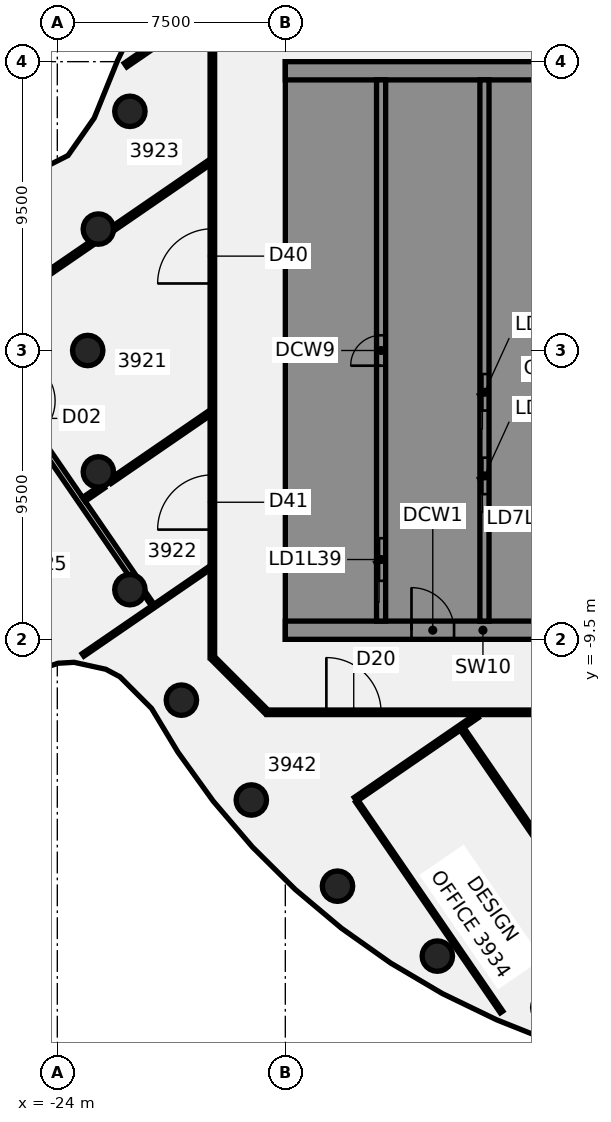
"""IFC4 building model, lengths in metres.
Left out: names, types, materials, properties, quantities, classifications, styles, units other than length and angle.
Written with IfcOpenShell. Run it as: python <this file> out.ifc"""

import sys

from ifc_helpers import new_model, si_unit, direction, frame, frame_2d, origin, origin_2d, place, context, subcontext, project, spatial, polyline, rectangle, circle, outline, extrude, element, fill, save


model = new_model("IFC4")
c1 = context("Model", 3, precision=1e-05, world=origin(), true_north=direction((0.0, 1.0)))
c2 = subcontext(c1, "Body", "Model", "MODEL_VIEW")
j1 = project(units=[si_unit("LENGTHUNIT", "METRE"), si_unit("PLANEANGLEUNIT", "RADIAN")], contexts=[c1])
p1 = place(None, origin())
s1 = spatial("IfcSite", under=j1, at=p1, CompositionType="ELEMENT")
p2 = place(p1, origin())
s2 = spatial("IfcBuilding", under=s1, at=p2, CompositionType="ELEMENT")
p3 = place(p2, frame((0.0, 0.0, 159.25)))
s3 = spatial("IfcBuildingStorey", under=s2, at=p3, CompositionType="ELEMENT", Elevation=159.25)
for number, where, z_axis, x_axis in (
    (1, (-21.613, 7.866, -0.14), (0.0, 0.0, 1.0), (1.0, 0.0, 0.0)),
    (2, (-22.651, 3.994, -0.14), (0.0, 0.0, 1.0), (1.0, 0.0, 0.0)),
    (3, (-23.0, 0.0, -0.14), (0.0, 0.0, 1.0), (1.0, 0.0, 0.0)),
    (4, (-22.651, -3.994, -0.14), (0.0, 0.0, 1.0), (1.0, 0.0, 0.0)),
    (5, (-21.613, -7.866, -0.14), (0.0, 0.0, 1.0), (1.0, 0.0, 0.0)),
    (6, (-19.919, -11.5, -0.14), (0.0, 0.0, 1.0), (1.0, 0.0, 0.0)),
    (7, (-17.619, -14.784, -0.14), (0.0, 0.0, 1.0), (1.0, 0.0, 0.0)),
    (8, (-14.784, -17.619, -0.14), (0.0, 0.0, 1.0), (1.0, 0.0, 0.0)),
    (9, (-11.5, -19.919, -0.14), (0.0, 0.0, 1.0), (1.0, 0.0, 0.0)),
):
    element("IfcColumn", number, at=place(p3, frame(where, z_axis=z_axis, x_axis=x_axis)), inside=s3, PredefinedType="COLUMN", context=c2, shape_type="SweptSolid", body=[
        extrude(circle(Radius=0.5, at=origin_2d()), origin(), (0.0, 0.0, 1.0), 3.75),
    ])
p4 = place(p3, frame((-28.925, 3.371, 0.0), z_axis=(0.0, 0.0, 1.0), x_axis=(0.566012012603, -0.82439699271, 0.0)))
e10 = element("IfcWall", 10, at=p4, inside=s3, PredefinedType="PARTITIONING", context=c2, shape_type="SweptSolid", body=[
    extrude(rectangle(XDim=13.034, YDim=0.2, at=frame_2d((6.517, 0.0))), origin(), (0.0, 0.0, 1.0), 3.01),
])
p5 = place(p4, frame((6.099, 0.0, 0.0)))
e11 = element("IfcOpeningElement", 11, at=p5, cuts=e10, PredefinedType="OPENING", context=c2, shape_type="SweptSolid", body=[
    extrude(rectangle(XDim=1.4, YDim=2.1, at=frame_2d((0.7, 1.05))), frame((0.0, 0.11, 0.0), z_axis=(0.0, -1.0, 0.0), x_axis=(1.0, 0.0, 0.0)), (0.0, 0.0, 1.0), 0.22),
])
p6 = place(p3, frame((-21.133, -7.977, 0.0), z_axis=(0.0, 0.0, 1.0), x_axis=(0.565734664981, -0.824587344579, 0.0)))
e12 = element("IfcWall", 12, at=p6, inside=s3, PredefinedType="PARTITIONING", context=c2, shape_type="SweptSolid", body=[
    extrude(rectangle(XDim=0.483, YDim=0.1, at=frame_2d((0.241, 0.0))), origin(), (0.0, 0.0, 1.0), 3.01),
])
p7 = place(p3, frame((-14.147, -14.824, 0.0), z_axis=(0.0, 0.0, 1.0), x_axis=(0.566078955543, -0.824351027228, 0.0)))
e13 = element("IfcWall", 13, at=p7, inside=s3, PredefinedType="PARTITIONING", context=c2, shape_type="SweptSolid", body=[
    extrude(rectangle(XDim=8.408, YDim=0.1, at=frame_2d((4.204, 0.0))), origin(), (0.0, 0.0, 1.0), 3.01),
])
p8 = place(p3, frame((-10.683, -12.45, 0.0), z_axis=(0.0, 0.0, 1.0), x_axis=(0.566088385471, -0.82434455165, 0.0)))
e14 = element("IfcWall", 14, at=p8, inside=s3, PredefinedType="PARTITIONING", context=c2, shape_type="SweptSolid", body=[
    extrude(rectangle(XDim=11.765, YDim=0.15, at=frame_2d((5.882, 0.0))), origin(), (0.0, 0.0, 1.0), 3.01),
])
p9 = place(p8, frame((3.82, 0.0, 0.0)))
e15 = element("IfcOpeningElement", 15, at=p9, cuts=e14, PredefinedType="OPENING", context=c2, shape_type="SweptSolid", body=[
    extrude(rectangle(XDim=0.9, YDim=2.1, at=frame_2d((0.45, 1.05))), frame((0.0, 0.085, 0.0), z_axis=(0.0, -1.0, 0.0), x_axis=(1.0, 0.0, 0.0)), (0.0, 0.0, 1.0), 0.17),
])
p10 = place(p3, frame((-18.872, -10.128, 0.0), z_axis=(0.0, 0.0, 1.0), x_axis=(0.707106781187, -0.707106781187, 0.0)))
e16 = element("IfcWall", 16, at=p10, inside=s3, PredefinedType="PARTITIONING", context=c2, shape_type="SweptSolid", body=[
    extrude(rectangle(XDim=2.465, YDim=0.15, at=frame_2d((1.232, 0.0))), origin(), (0.0, 0.0, 1.0), 3.01),
])
p11 = place(p3, frame((-17.1, -11.9, 0.0), z_axis=(0.0, 0.0, 1.0), x_axis=(1.0, 0.0, 0.0)))
e17 = element("IfcWall", 17, at=p11, inside=s3, PredefinedType="PARTITIONING", context=c2, shape_type="SweptSolid", body=[
    extrude(rectangle(XDim=34.165, YDim=0.15, at=frame_2d((17.083, 0.0))), origin(), (0.0, 0.0, 1.0), 3.01),
])
p12 = place(p11, frame((9.777, 0.0, 0.0)))
e18 = element("IfcOpeningElement", 18, at=p12, cuts=e17, PredefinedType="OPENING", context=c2, shape_type="SweptSolid", body=[
    extrude(rectangle(XDim=1.8, YDim=2.1, at=frame_2d((0.9, 1.05))), frame((0.0, 0.085, 0.0), z_axis=(0.0, -1.0, 0.0), x_axis=(1.0, 0.0, 0.0)), (0.0, 0.0, 1.0), 0.17),
])
p13 = place(p11, frame((1.95, 0.0, 0.0)))
e19 = element("IfcOpeningElement", 19, at=p13, cuts=e17, PredefinedType="OPENING", context=c2, shape_type="SweptSolid", body=[
    extrude(rectangle(XDim=1.8, YDim=2.1, at=frame_2d((0.9, 1.05))), frame((0.0, 0.085, 0.0), z_axis=(0.0, -1.0, 0.0), x_axis=(1.0, 0.0, 0.0)), (0.0, 0.0, 1.0), 0.17),
])
p14 = place(p11, frame((23.884, 0.0, 0.0)))
e20 = element("IfcOpeningElement", 20, at=p14, cuts=e17, PredefinedType="OPENING", context=c2, shape_type="SweptSolid", body=[
    extrude(rectangle(XDim=1.8, YDim=2.1, at=frame_2d((0.9, 1.05))), frame((0.0, 0.085, 0.0), z_axis=(0.0, -1.0, 0.0), x_axis=(1.0, 0.0, 0.0)), (0.0, 0.0, 1.0), 0.17),
])
p15 = place(p3, frame((-26.975, 0.708, 0.0), z_axis=(0.0, 0.0, 1.0), x_axis=(0.824360979783, 0.566064461887, 0.0)))
e21 = element("IfcWall", 21, at=p15, inside=s3, PredefinedType="PARTITIONING", context=c2, shape_type="SweptSolid", body=[
    extrude(rectangle(XDim=4.999, YDim=0.15, at=frame_2d((2.5, 0.0))), origin(), (0.0, 0.0, 1.0), 3.01),
])
p16 = place(p15, frame((2.6, 0.0, 0.0)))
e22 = element("IfcOpeningElement", 22, at=p16, cuts=e21, PredefinedType="OPENING", context=c2, shape_type="SweptSolid", body=[
    extrude(rectangle(XDim=0.9, YDim=2.1, at=frame_2d((0.45, 1.05))), frame((0.0, 0.085, 0.0), z_axis=(0.0, -1.0, 0.0), x_axis=(1.0, 0.0, 0.0)), (0.0, 0.0, 1.0), 0.17),
])
p17 = place(p3, frame((-22.148, 4.023, 0.0), z_axis=(0.0, 0.0, 1.0), x_axis=(0.824392319221, 0.566018819484, 0.0)))
e23 = element("IfcWall", 23, at=p17, inside=s3, PredefinedType="PARTITIONING", context=c2, shape_type="SweptSolid", body=[
    extrude(rectangle(XDim=3.82, YDim=0.15, at=frame_2d((1.91, 0.0))), origin(), (0.0, 0.0, 1.0), 3.01),
])
p18 = place(p3, frame((-23.125, -4.897, 0.0), z_axis=(0.0, 0.0, 1.0), x_axis=(0.82422658894, 0.566260125812, 0.0)))
e24 = element("IfcWall", 24, at=p18, inside=s3, PredefinedType="PARTITIONING", context=c2, shape_type="SweptSolid", body=[
    extrude(rectangle(XDim=0.771, YDim=0.15, at=frame_2d((0.386, 0.0))), origin(), (0.0, 0.0, 1.0), 3.01),
])
p19 = place(p3, frame((-22.27, -4.31, 0.0), z_axis=(0.0, 0.0, 1.0), x_axis=(0.824390062348, 0.566022106549, 0.0)))
e25 = element("IfcWall", 25, at=p19, inside=s3, PredefinedType="PARTITIONING", context=c2, shape_type="SweptSolid", body=[
    extrude(rectangle(XDim=3.968, YDim=0.15, at=frame_2d((1.984, 0.0))), origin(), (0.0, 0.0, 1.0), 3.01),
])
p20 = place(p3, frame((-23.154, -10.012, 0.0), z_axis=(0.0, 0.0, 1.0), x_axis=(0.824333501628, 0.566104476307, 0.0)))
e26 = element("IfcWall", 26, at=p20, inside=s3, PredefinedType="PARTITIONING", context=c2, shape_type="SweptSolid", body=[
    extrude(rectangle(XDim=5.055, YDim=0.1, at=frame_2d((2.528, 0.0))), origin(), (0.0, 0.0, 1.0), 3.01),
])
p21 = place(p3, frame((-21.756, 9.387, 0.0), z_axis=(0.0, 0.0, 1.0), x_axis=(0.824352472228, 0.56607685126, 0.0)))
e27 = element("IfcWall", 27, at=p21, inside=s3, PredefinedType="PARTITIONING", context=c2, shape_type="SweptSolid", body=[
    extrude(rectangle(XDim=8.484, YDim=0.15, at=frame_2d((4.242, 0.0))), origin(), (0.0, 0.0, 1.0), 3.01),
])
p22 = place(p3, frame((-14.19, -14.762, 0.0), z_axis=(0.0, 0.0, 1.0), x_axis=(0.824280034462, 0.566182324686, 0.0)))
e28 = element("IfcWall", 28, at=p22, inside=s3, PredefinedType="PARTITIONING", context=c2, shape_type="SweptSolid", body=[
    extrude(rectangle(XDim=4.845, YDim=0.15, at=frame_2d((2.422, 0.0))), origin(), (0.0, 0.0, 1.0), 3.01),
])
p23 = place(p3, frame((-18.9, -10.1, 0.0), z_axis=(0.0, 0.0, 1.0), x_axis=(0.0, 1.0, 0.0)))
e29 = element("IfcWall", 29, at=p23, inside=s3, PredefinedType="PARTITIONING", context=c2, shape_type="SweptSolid", body=[
    extrude(rectangle(XDim=20.2, YDim=0.15, at=frame_2d((10.1, 0.0))), origin(), (0.0, 0.0, 1.0), 3.01),
])
p24 = place(p23, frame((12.304, 0.0, 0.0)))
e30 = element("IfcOpeningElement", 30, at=p24, cuts=e29, PredefinedType="OPENING", context=c2, shape_type="SweptSolid", body=[
    extrude(rectangle(XDim=1.8, YDim=2.1, at=frame_2d((0.9, 1.05))), frame((0.0, 0.085, 0.0), z_axis=(0.0, -1.0, 0.0), x_axis=(1.0, 0.0, 0.0)), (0.0, 0.0, 1.0), 0.17),
])
p25 = place(p23, frame((4.209, 0.0, 0.0)))
e31 = element("IfcOpeningElement", 31, at=p25, cuts=e29, PredefinedType="OPENING", context=c2, shape_type="SweptSolid", body=[
    extrude(rectangle(XDim=1.8, YDim=2.1, at=frame_2d((0.9, 1.05))), frame((0.0, 0.085, 0.0), z_axis=(0.0, -1.0, 0.0), x_axis=(1.0, 0.0, 0.0)), (0.0, 0.0, 1.0), 0.17),
])
p26 = place(p3, frame((-16.5, -9.2, 0.0), z_axis=(0.0, 0.0, 1.0), x_axis=(1.0, 0.0, 0.0)))
e32 = element("IfcWall", 32, at=p26, inside=s3, PredefinedType="SHEAR", context=c2, shape_type="SweptSolid", body=[
    extrude(rectangle(XDim=13.0, YDim=0.6, at=frame_2d((6.5, 0.0))), origin(), (0.0, 0.0, 1.0), 3.61),
])
p27 = place(p26, frame((4.15, 0.0, 0.0)))
e33 = element("IfcOpeningElement", 33, at=p27, cuts=e32, PredefinedType="OPENING", context=c2, shape_type="SweptSolid", body=[
    extrude(rectangle(XDim=1.4, YDim=2.1, at=frame_2d((0.7, 1.05))), frame((0.0, 0.31, 0.0), z_axis=(0.0, -1.0, 0.0), x_axis=(1.0, 0.0, 0.0)), (0.0, 0.0, 1.0), 0.62),
])
p28 = place(p26, frame((10.125, 0.0, 0.0)))
e34 = element("IfcOpeningElement", 34, at=p28, cuts=e32, PredefinedType="OPENING", context=c2, shape_type="SweptSolid", body=[
    extrude(rectangle(XDim=1.4, YDim=2.1, at=frame_2d((0.7, 1.05))), frame((0.0, 0.31, 0.0), z_axis=(0.0, -1.0, 0.0), x_axis=(1.0, 0.0, 0.0)), (0.0, 0.0, 1.0), 0.62),
])
p29 = place(p3, origin())
e35 = element("IfcWall", 35, at=p29, inside=s3, PredefinedType="SHEAR", context=c2, shape_type="SweptSolid", body=[
    extrude(outline(polyline([(-13.5, -8.125), (-15.9, -8.125), (-15.9, -5.625), (-13.5, -5.625), (-13.5, -5.375), (-15.9, -5.375), (-15.9, 5.375), (-13.5, 5.375), (-13.5, 5.625), (-15.9, 5.625), (-15.9, 8.125), (-13.5, 8.125), (-13.5, 8.9), (-15.9, 8.9), (-16.5, 8.9), (-16.5, -8.9), (-15.9, -8.9), (-13.5, -8.9), (-13.5, -8.125)])), origin(), (0.0, 0.0, 1.0), 3.61),
])
p30 = place(p3, frame((-16.5, 9.2, 0.0), z_axis=(0.0, 0.0, 1.0), x_axis=(1.0, 0.0, 0.0)))
e36 = element("IfcWall", 36, at=p30, inside=s3, PredefinedType="SHEAR", context=c2, shape_type="SweptSolid", body=[
    extrude(rectangle(XDim=13.0, YDim=0.6, at=frame_2d((6.5, 0.0))), origin(), (0.0, 0.0, 1.0), 3.61),
])
p31 = place(p3, origin())
e37 = element("IfcWall", 37, at=p31, inside=s3, PredefinedType="SHEAR", context=c2, shape_type="SweptSolid", body=[
    extrude(outline(polyline([(-9.8, -5.375), (-9.8, -5.625), (-7.5, -5.625), (-7.2, -5.625), (-7.2, 8.9), (-7.5, 8.9), (-9.8, 8.9), (-9.8, 8.125), (-7.5, 8.125), (-7.5, 5.625), (-9.8, 5.625), (-9.8, 5.375), (-7.5, 5.375), (-7.5, 2.875), (-9.8, 2.875), (-9.8, 2.625), (-7.5, 2.625), (-7.5, 0.125), (-9.8, 0.125), (-9.8, -0.125), (-7.5, -0.125), (-7.5, -2.625), (-9.8, -2.625), (-9.8, -2.875), (-7.5, -2.875), (-7.5, -5.375), (-9.8, -5.375)])), origin(), (0.0, 0.0, 1.0), 3.61),
])
p32 = place(p3, origin())
e38 = element("IfcWall", 38, at=p32, inside=s3, PredefinedType="SHEAR", context=c2, shape_type="SweptSolid", body=[
    extrude(outline(polyline([(-7.5, -8.125), (-9.55, -8.125), (-9.55, -5.625), (-9.8, -5.625), (-9.8, -8.125), (-9.8, -8.9), (-7.5, -8.9), (-7.5, -8.125)])), origin(), (0.0, 0.0, 1.0), 3.61),
])
p33 = place(p3, frame((-13.35, -8.9, 0.0), z_axis=(0.0, 0.0, 1.0), x_axis=(0.0, 1.0, 0.0)))
e39 = element("IfcWall", 39, at=p33, inside=s3, PredefinedType="SHEAR", context=c2, shape_type="SweptSolid", body=[
    extrude(rectangle(XDim=17.8, YDim=0.3, at=frame_2d((8.9, 0.0))), origin(), (0.0, 0.0, 1.0), 3.61),
])
p34 = place(p33, frame((1.325, 0.0, 0.0)))
e40 = element("IfcOpeningElement", 40, at=p34, cuts=e39, PredefinedType="OPENING", context=c2, shape_type="SweptSolid", body=[
    extrude(rectangle(XDim=1.4, YDim=2.1, at=frame_2d((0.7, 1.05))), frame((0.0, 0.16, 0.0), z_axis=(0.0, -1.0, 0.0), x_axis=(1.0, 0.0, 0.0)), (0.0, 0.0, 1.0), 0.32),
])
p35 = place(p33, frame((8.4, 0.0, 0.0)))
e41 = element("IfcOpeningElement", 41, at=p35, cuts=e39, PredefinedType="OPENING", context=c2, shape_type="SweptSolid", body=[
    extrude(rectangle(XDim=1.0, YDim=2.1, at=frame_2d((0.5, 1.05))), frame((0.0, 0.16, 0.0), z_axis=(0.0, -1.0, 0.0), x_axis=(1.0, 0.0, 0.0)), (0.0, 0.0, 1.0), 0.32),
])
p36 = place(p3, frame((-9.95, -8.9, 0.0), z_axis=(0.0, 0.0, 1.0), x_axis=(0.0, 1.0, 0.0)))
e42 = element("IfcWall", 42, at=p36, inside=s3, PredefinedType="SHEAR", context=c2, shape_type="SweptSolid", body=[
    extrude(rectangle(XDim=17.8, YDim=0.3, at=frame_2d((8.9, 0.0))), origin(), (0.0, 0.0, 1.0), 3.61),
])
p37 = place(p36, frame((4.175, 0.0, 0.0)))
e43 = element("IfcOpeningElement", 43, at=p37, cuts=e42, PredefinedType="OPENING", context=c2, shape_type="SweptSolid", body=[
    extrude(rectangle(XDim=1.2, YDim=2.1, at=frame_2d((0.6, 1.05))), frame((0.0, 0.16, 0.0), z_axis=(0.0, -1.0, 0.0), x_axis=(1.0, 0.0, 0.0)), (0.0, 0.0, 1.0), 0.32),
])
p38 = place(p36, frame((6.925, 0.0, 0.0)))
e44 = element("IfcOpeningElement", 44, at=p38, cuts=e42, PredefinedType="OPENING", context=c2, shape_type="SweptSolid", body=[
    extrude(rectangle(XDim=1.2, YDim=2.1, at=frame_2d((0.6, 1.05))), frame((0.0, 0.16, 0.0), z_axis=(0.0, -1.0, 0.0), x_axis=(1.0, 0.0, 0.0)), (0.0, 0.0, 1.0), 0.32),
])
p39 = place(p9, frame((0.9, 0.0, 0.0), z_axis=(0.0, 0.0, 1.0), x_axis=(-1.0, 0.0, 0.0)))
e45 = element("IfcDoor", 45, at=p39, inside=s3, OperationType="SINGLE_SWING_LEFT", PredefinedType="DOOR", context=c2, shape_type="SweptSolid", body=[
    extrude(rectangle(XDim=0.9, YDim=2.1, at=frame_2d((0.45, 1.05))), frame((0.0, 0.025, 0.0), z_axis=(0.0, -1.0, 0.0), x_axis=(1.0, 0.0, 0.0)), (0.0, 0.0, 1.0), 0.05),
])
fill(e15, e45)
p40 = place(p13, frame((1.8, 0.0, 0.0), z_axis=(0.0, 0.0, 1.0), x_axis=(-1.0, 0.0, 0.0)))
e46 = element("IfcDoor", 46, at=p40, inside=s3, OperationType="DOUBLE_DOOR_SINGLE_SWING", PredefinedType="DOOR", context=c2, shape_type="SweptSolid", body=[
    extrude(rectangle(XDim=1.8, YDim=2.1, at=frame_2d((0.9, 1.05))), frame((0.0, 0.025, 0.0), z_axis=(0.0, -1.0, 0.0), x_axis=(1.0, 0.0, 0.0)), (0.0, 0.0, 1.0), 0.05),
])
fill(e19, e46)
p41 = place(p16, origin())
e47 = element("IfcDoor", 47, at=p41, inside=s3, OperationType="SINGLE_SWING_LEFT", PredefinedType="DOOR", context=c2, shape_type="SweptSolid", body=[
    extrude(rectangle(XDim=0.9, YDim=2.1, at=frame_2d((0.45, 1.05))), frame((0.0, 0.025, 0.0), z_axis=(0.0, -1.0, 0.0), x_axis=(1.0, 0.0, 0.0)), (0.0, 0.0, 1.0), 0.05),
])
fill(e22, e47)
p42 = place(p24, frame((1.8, 0.0, 0.0), z_axis=(0.0, 0.0, 1.0), x_axis=(-1.0, 0.0, 0.0)))
e48 = element("IfcDoor", 48, at=p42, inside=s3, OperationType="DOUBLE_DOOR_SINGLE_SWING", PredefinedType="DOOR", context=c2, shape_type="SweptSolid", body=[
    extrude(rectangle(XDim=1.8, YDim=2.1, at=frame_2d((0.9, 1.05))), frame((0.0, 0.025, 0.0), z_axis=(0.0, -1.0, 0.0), x_axis=(1.0, 0.0, 0.0)), (0.0, 0.0, 1.0), 0.05),
])
fill(e30, e48)
p43 = place(p25, origin())
e49 = element("IfcDoor", 49, at=p43, inside=s3, OperationType="DOUBLE_DOOR_SINGLE_SWING", PredefinedType="DOOR", context=c2, shape_type="SweptSolid", body=[
    extrude(rectangle(XDim=1.8, YDim=2.1, at=frame_2d((0.9, 1.05))), frame((0.0, 0.025, 0.0), z_axis=(0.0, -1.0, 0.0), x_axis=(1.0, 0.0, 0.0)), (0.0, 0.0, 1.0), 0.05),
])
fill(e31, e49)
p44 = place(p27, origin())
e50 = element("IfcDoor", 50, at=p44, inside=s3, OperationType="SINGLE_SWING_LEFT", PredefinedType="DOOR", context=c2, shape_type="SweptSolid", body=[
    extrude(rectangle(XDim=1.4, YDim=2.1, at=frame_2d((0.7, 1.05))), frame((0.0, 0.025, 0.0), z_axis=(0.0, -1.0, 0.0), x_axis=(1.0, 0.0, 0.0)), (0.0, 0.0, 1.0), 0.05),
])
fill(e33, e50)
p45 = place(p34, origin())
e51 = element("IfcDoor", 51, at=p45, inside=s3, OperationType="SLIDING_TO_LEFT", PredefinedType="DOOR", context=c2, shape_type="SweptSolid", body=[
    extrude(rectangle(XDim=1.4, YDim=2.1, at=frame_2d((0.7, 1.05))), frame((0.0, 0.025, 0.0), z_axis=(0.0, -1.0, 0.0), x_axis=(1.0, 0.0, 0.0)), (0.0, 0.0, 1.0), 0.05),
])
fill(e40, e51)
p46 = place(p37, origin())
e52 = element("IfcDoor", 52, at=p46, inside=s3, OperationType="SLIDING_TO_LEFT", PredefinedType="DOOR", context=c2, shape_type="SweptSolid", body=[
    extrude(rectangle(XDim=1.2, YDim=2.1, at=frame_2d((0.6, 1.05))), frame((0.0, 0.025, 0.0), z_axis=(0.0, -1.0, 0.0), x_axis=(1.0, 0.0, 0.0)), (0.0, 0.0, 1.0), 0.05),
])
fill(e43, e52)
p47 = place(p38, origin())
e53 = element("IfcDoor", 53, at=p47, inside=s3, OperationType="SLIDING_TO_LEFT", PredefinedType="DOOR", context=c2, shape_type="SweptSolid", body=[
    extrude(rectangle(XDim=1.2, YDim=2.1, at=frame_2d((0.6, 1.05))), frame((0.0, 0.025, 0.0), z_axis=(0.0, -1.0, 0.0), x_axis=(1.0, 0.0, 0.0)), (0.0, 0.0, 1.0), 0.05),
])
fill(e44, e53)
p48 = place(p35, origin())
e54 = element("IfcDoor", 54, at=p48, inside=s3, OperationType="SINGLE_SWING_LEFT", PredefinedType="DOOR", context=c2, shape_type="SweptSolid", body=[
    extrude(rectangle(XDim=1.0, YDim=2.1, at=frame_2d((0.5, 1.05))), frame((0.0, 0.025, 0.0), z_axis=(0.0, -1.0, 0.0), x_axis=(1.0, 0.0, 0.0)), (0.0, 0.0, 1.0), 0.05),
])
fill(e41, e54)
save(model, sys.argv[1])
